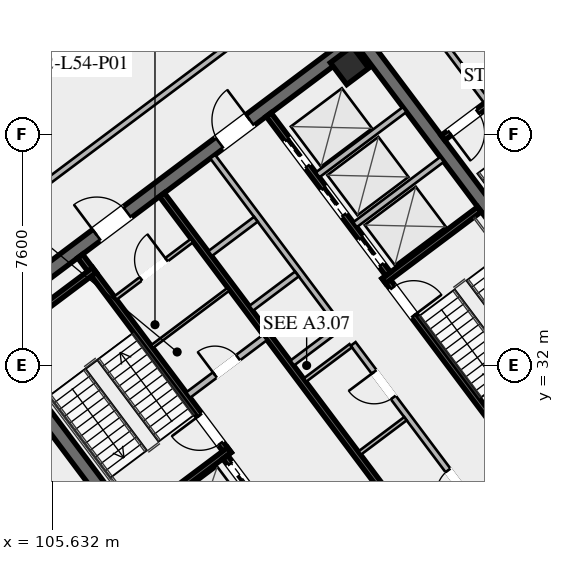
"""IFC4 building model, lengths in metres.
Left out: names, types, materials, properties, quantities, classifications, styles, units other than length and angle.
Written with IfcOpenShell. Run it as: python <this file> out.ifc"""

import sys

from ifc_helpers import new_model, si_unit, direction, frame, frame_2d, origin, origin_2d, place, context, subcontext, project, spatial, rectangle, hollow_rectangle, extrude, element, fill, save


model = new_model("IFC4")
c1 = context("Model", 3, precision=1e-05, world=origin(), true_north=direction((0.0, 1.0)))
c2 = subcontext(c1, "Body", "Model", "MODEL_VIEW")
j1 = project(units=[si_unit("LENGTHUNIT", "METRE"), si_unit("PLANEANGLEUNIT", "RADIAN")], contexts=[c1])
p1 = place(None, origin())
s1 = spatial("IfcSite", under=j1, at=p1, CompositionType="ELEMENT")
p2 = place(p1, origin())
s2 = spatial("IfcBuilding", under=s1, at=p2, CompositionType="ELEMENT")
p3 = place(p2, frame((0.0, 0.0, 199.6)))
s3 = spatial("IfcBuildingStorey", under=s2, at=p3, CompositionType="ELEMENT", Elevation=199.6)
for number, where, z_axis, x_axis in (
    (1, (112.396, 21.047, 0.0), (0.0, 0.0, 1.0), (-0.6, 0.8, 0.0)),
    (2, (115.604, 42.953, 0.0), (0.0, 0.0, 1.0), (0.6, -0.8, 0.0)),
):
    element("IfcWall", number, at=place(p3, frame(where, z_axis=z_axis, x_axis=x_axis)), inside=s3, PredefinedType="SHEAR", context=c2, shape_type="SweptSolid", body=[
        extrude(rectangle(XDim=15.6, YDim=0.45, at=frame_2d((7.8, 0.0))), origin(), (0.0, 0.0, 1.0), 4.6),
    ])
p4 = place(p3, frame((124.649, 30.518, 0.0), z_axis=(0.0, 0.0, 1.0), x_axis=(-0.8, -0.6, 0.0)))
e3 = element("IfcWall", 3, at=p4, inside=s3, PredefinedType="SHEAR", context=c2, shape_type="SweptSolid", body=[
    extrude(rectangle(XDim=15.26, YDim=0.45, at=frame_2d((7.63, 0.0))), origin(), (0.0, 0.0, 1.0), 4.6),
])
p5 = place(p4, frame((9.33, 0.0, 0.0)))
e4 = element("IfcOpeningElement", 4, at=p5, cuts=e3, PredefinedType="OPENING", context=c2, shape_type="SweptSolid", body=[
    extrude(rectangle(XDim=1.25, YDim=2.25, at=frame_2d((0.625, 1.125))), frame((0.0, 0.235, 0.0), z_axis=(0.0, -1.0, 0.0), x_axis=(1.0, 0.0, 0.0)), (0.0, 0.0, 1.0), 0.47),
])
p6 = place(p4, frame((4.28, 0.0, 0.0)))
e5 = element("IfcOpeningElement", 5, at=p6, cuts=e3, PredefinedType="OPENING", context=c2, shape_type="SweptSolid", body=[
    extrude(rectangle(XDim=1.25, YDim=2.25, at=frame_2d((0.625, 1.125))), frame((0.0, 0.235, 0.0), z_axis=(0.0, -1.0, 0.0), x_axis=(1.0, 0.0, 0.0)), (0.0, 0.0, 1.0), 0.47),
])
p7 = place(p3, frame((103.351, 33.482, 0.0), z_axis=(0.0, 0.0, 1.0), x_axis=(0.8, 0.6, 0.0)))
e6 = element("IfcWall", 6, at=p7, inside=s3, PredefinedType="SHEAR", context=c2, shape_type="SweptSolid", body=[
    extrude(rectangle(XDim=15.26, YDim=0.45, at=frame_2d((7.63, 0.0))), origin(), (0.0, 0.0, 1.0), 4.6),
])
p8 = place(p7, frame((4.68, 0.0, 0.0)))
e7 = element("IfcOpeningElement", 7, at=p8, cuts=e6, PredefinedType="OPENING", context=c2, shape_type="SweptSolid", body=[
    extrude(rectangle(XDim=1.25, YDim=2.25, at=frame_2d((0.625, 1.125))), frame((0.0, 0.235, 0.0), z_axis=(0.0, -1.0, 0.0), x_axis=(1.0, 0.0, 0.0)), (0.0, 0.0, 1.0), 0.47),
])
p9 = place(p7, frame((9.73, 0.0, 0.0)))
e8 = element("IfcOpeningElement", 8, at=p9, cuts=e6, PredefinedType="OPENING", context=c2, shape_type="SweptSolid", body=[
    extrude(rectangle(XDim=1.25, YDim=2.25, at=frame_2d((0.625, 1.125))), frame((0.0, 0.235, 0.0), z_axis=(0.0, -1.0, 0.0), x_axis=(1.0, 0.0, 0.0)), (0.0, 0.0, 1.0), 0.47),
])
p10 = place(p3, frame((115.41, 41.87, 0.0), z_axis=(0.0, 0.0, 1.0), x_axis=(0.799999996291, 0.600000004945, 0.0)))
e9 = element("IfcColumn", 9, at=p10, inside=s3, PredefinedType="COLUMN", context=c2, shape_type="SweptSolid", body=[
    extrude(hollow_rectangle(XDim=0.9, YDim=0.9, WallThickness=0.04, at=origin_2d()), origin(), (0.0, 0.0, 1.0), 4.42),
])
for number, where, z_axis, x_axis in (
    (10, (109.704, 11.928, 0.0), (0.0, 0.0, 1.0), (-0.6, 0.8, 0.0)),
    (11, (93.928, 36.296, 0.0), (0.0, 0.0, 1.0), (0.8, 0.6, 0.0)),
    (12, (118.296, 52.072, 0.0), (0.0, 0.0, 1.0), (0.6, -0.8, 0.0)),
):
    element("IfcWall", number, at=place(p3, frame(where, z_axis=z_axis, x_axis=x_axis)), inside=s3, PredefinedType="SOLIDWALL", context=c2, shape_type="SweptSolid", body=[
        extrude(rectangle(XDim=26.96, YDim=0.28, at=frame_2d((13.48, 0.0))), origin(), (0.0, 0.0, 1.0), 4.42),
    ])
p11 = place(p3, frame((111.44, 29.08, 0.0), z_axis=(0.0, 0.0, 1.0), x_axis=(-0.59999041401, 0.800007189403, 0.0)))
e13 = element("IfcWall", 13, at=p11, inside=s3, PredefinedType="SHEAR", context=c2, shape_type="SweptSolid", body=[
    extrude(rectangle(XDim=8.15, YDim=0.2, at=frame_2d((4.075, 0.0))), origin(), (0.0, 0.0, 1.0), 4.42),
])
p12 = place(p11, frame((0.45, 0.0, 0.0)))
e14 = element("IfcOpeningElement", 14, at=p12, cuts=e13, PredefinedType="OPENING", context=c2, shape_type="SweptSolid", body=[
    extrude(rectangle(XDim=1.15, YDim=2.2, at=frame_2d((0.575, 1.1))), frame((0.0, 0.11, 0.0), z_axis=(0.0, -1.0, 0.0), x_axis=(1.0, 0.0, 0.0)), (0.0, 0.0, 1.0), 0.22),
])
for number, where, z_axis, x_axis in (
    (15, (108.316, 26.862, 0.0), (0.0, 0.0, 1.0), (0.8, 0.6, 0.0)),
    (16, (103.876, 32.782, 0.0), (0.0, 0.0, 1.0), (0.8, 0.6, 0.0)),
):
    element("IfcWall", number, at=place(p3, frame(where, z_axis=z_axis, x_axis=x_axis)), inside=s3, PredefinedType="SHEAR", context=c2, shape_type="SweptSolid", body=[
        extrude(rectangle(XDim=3.93, YDim=0.2, at=frame_2d((1.965, 0.0))), origin(), (0.0, 0.0, 1.0), 4.42),
    ])
p13 = place(p3, frame((116.56, 34.92, 0.0), z_axis=(0.0, 0.0, 1.0), x_axis=(0.59999041401, -0.800007189403, 0.0)))
e17 = element("IfcWall", 17, at=p13, inside=s3, PredefinedType="SHEAR", context=c2, shape_type="SweptSolid", body=[
    extrude(rectangle(XDim=8.15, YDim=0.2, at=frame_2d((4.075, 0.0))), origin(), (0.0, 0.0, 1.0), 4.42),
])
p14 = place(p13, frame((0.45, 0.0, 0.0)))
e18 = element("IfcOpeningElement", 18, at=p14, cuts=e17, PredefinedType="OPENING", context=c2, shape_type="SweptSolid", body=[
    extrude(rectangle(XDim=1.15, YDim=2.2, at=frame_2d((0.575, 1.1))), frame((0.0, 0.11, 0.0), z_axis=(0.0, -1.0, 0.0), x_axis=(1.0, 0.0, 0.0)), (0.0, 0.0, 1.0), 0.22),
])
p15 = place(p3, frame((116.54, 34.78, 0.0), z_axis=(0.0, 0.0, 1.0), x_axis=(0.800014909178, 0.599980120581, 0.0)))
e19 = element("IfcWall", 19, at=p15, inside=s3, PredefinedType="SHEAR", context=c2, shape_type="SweptSolid", body=[
    extrude(rectangle(XDim=3.93, YDim=0.2, at=frame_2d((1.965, 0.0))), origin(), (0.0, 0.0, 1.0), 4.42),
])
p16 = place(p3, frame((118.058, 25.856, 0.0), z_axis=(0.0, 0.0, 1.0), x_axis=(-0.600002657301, 0.799998007018, 0.0)))
e20 = element("IfcWall", 20, at=p16, inside=s3, PredefinedType="SHEAR", context=c2, shape_type="SweptSolid", body=[
    extrude(rectangle(XDim=14.7, YDim=0.2, at=frame_2d((7.35, 0.0))), origin(), (0.0, 0.0, 1.0), 4.42),
])
p17 = place(p3, frame((110.104, 31.028, 0.0), z_axis=(0.0, 0.0, 1.0), x_axis=(0.800018601094, 0.59997519774, 0.0)))
e21 = element("IfcWall", 21, at=p17, inside=s3, PredefinedType="SOLIDWALL", context=c2, shape_type="SweptSolid", body=[
    extrude(rectangle(XDim=3.15, YDim=0.22, at=frame_2d((1.575, 0.0))), origin(), (0.0, 0.0, 1.0), 3.531),
])
p18 = place(p17, frame((1.1, 0.0, 0.0)))
e22 = element("IfcOpeningElement", 22, at=p18, cuts=e21, PredefinedType="OPENING", context=c2, shape_type="SweptSolid", body=[
    extrude(rectangle(XDim=0.95, YDim=2.05, at=frame_2d((0.475, 1.025))), frame((0.0, 0.12, 0.0), z_axis=(0.0, -1.0, 0.0), x_axis=(1.0, 0.0, 0.0)), (0.0, 0.0, 1.0), 0.24),
])
p19 = place(p3, frame((115.25, 23.75, 0.0), z_axis=(0.0, 0.0, 1.0), x_axis=(-0.599994036198, 0.800004472816, 0.0)))
e23 = element("IfcWall", 23, at=p19, inside=s3, PredefinedType="SHEAR", context=c2, shape_type="SweptSolid", body=[
    extrude(rectangle(XDim=6.55, YDim=0.2, at=frame_2d((3.275, 0.0))), origin(), (0.0, 0.0, 1.0), 4.42),
])
p20 = place(p19, frame((4.975, 0.0, 0.0)))
e24 = element("IfcOpeningElement", 24, at=p20, cuts=e23, PredefinedType="OPENING", context=c2, shape_type="SweptSolid", body=[
    extrude(rectangle(XDim=1.3, YDim=2.25, at=frame_2d((0.65, 1.125))), frame((0.0, 0.11, 0.0), z_axis=(0.0, -1.0, 0.0), x_axis=(1.0, 0.0, 0.0)), (0.0, 0.0, 1.0), 0.22),
])
p21 = place(p19, frame((2.975, 0.0, 0.0)))
e25 = element("IfcOpeningElement", 25, at=p21, cuts=e23, PredefinedType="OPENING", context=c2, shape_type="SweptSolid", body=[
    extrude(rectangle(XDim=1.3, YDim=2.25, at=frame_2d((0.65, 1.125))), frame((0.0, 0.11, 0.0), z_axis=(0.0, -1.0, 0.0), x_axis=(1.0, 0.0, 0.0)), (0.0, 0.0, 1.0), 0.22),
])
p22 = place(p19, frame((0.775, 0.0, 0.0)))
e26 = element("IfcOpeningElement", 26, at=p22, cuts=e23, PredefinedType="OPENING", context=c2, shape_type="SweptSolid", body=[
    extrude(rectangle(XDim=1.3, YDim=2.25, at=frame_2d((0.65, 1.125))), frame((0.0, 0.11, 0.0), z_axis=(0.0, -1.0, 0.0), x_axis=(1.0, 0.0, 0.0)), (0.0, 0.0, 1.0), 0.22),
])
p23 = place(p3, frame((112.75, 40.25, 0.0), z_axis=(0.0, 0.0, 1.0), x_axis=(0.599994036198, -0.800004472816, 0.0)))
e27 = element("IfcWall", 27, at=p23, inside=s3, PredefinedType="SHEAR", context=c2, shape_type="SweptSolid", body=[
    extrude(rectangle(XDim=6.55, YDim=0.2, at=frame_2d((3.275, 0.0))), origin(), (0.0, 0.0, 1.0), 4.42),
])
p24 = place(p23, frame((5.075, 0.0, 0.0)))
e28 = element("IfcOpeningElement", 28, at=p24, cuts=e27, PredefinedType="OPENING", context=c2, shape_type="SweptSolid", body=[
    extrude(rectangle(XDim=1.1, YDim=2.2, at=frame_2d((0.55, 1.1))), frame((0.0, 0.11, 0.0), z_axis=(0.0, -1.0, 0.0), x_axis=(1.0, 0.0, 0.0)), (0.0, 0.0, 1.0), 0.22),
])
p25 = place(p23, frame((3.025, 0.0, 0.0)))
e29 = element("IfcOpeningElement", 29, at=p25, cuts=e27, PredefinedType="OPENING", context=c2, shape_type="SweptSolid", body=[
    extrude(rectangle(XDim=1.1, YDim=2.2, at=frame_2d((0.55, 1.1))), frame((0.0, 0.11, 0.0), z_axis=(0.0, -1.0, 0.0), x_axis=(1.0, 0.0, 0.0)), (0.0, 0.0, 1.0), 0.22),
])
p26 = place(p23, frame((1.025, 0.0, 0.0)))
e30 = element("IfcOpeningElement", 30, at=p26, cuts=e27, PredefinedType="OPENING", context=c2, shape_type="SweptSolid", body=[
    extrude(rectangle(XDim=1.1, YDim=2.2, at=frame_2d((0.55, 1.1))), frame((0.0, 0.11, 0.0), z_axis=(0.0, -1.0, 0.0), x_axis=(1.0, 0.0, 0.0)), (0.0, 0.0, 1.0), 0.22),
])
for number, where, z_axis, x_axis in (
    (31, (115.59, 36.63, 0.0), (0.0, 0.0, 1.0), (0.8, 0.6, 0.0)),
    (32, (114.36, 38.27, 0.0), (0.0, 0.0, 1.0), (0.8, 0.6, 0.0)),
):
    element("IfcWall", number, at=place(p3, frame(where, z_axis=z_axis, x_axis=x_axis)), inside=s3, PredefinedType="SOLIDWALL", context=c2, shape_type="SweptSolid", body=[
        extrude(rectangle(XDim=3.58, YDim=0.2, at=frame_2d((1.79, 0.0))), origin(), (0.0, 0.0, 1.0), 4.42),
    ])
p27 = place(p3, frame((107.71, 34.22, 0.0), z_axis=(0.0, 0.0, 1.0), x_axis=(0.799981399002, 0.60002480053, 0.0)))
e33 = element("IfcWall", 33, at=p27, inside=s3, PredefinedType="PARTITIONING", context=c2, shape_type="SweptSolid", body=[
    extrude(rectangle(XDim=3.15, YDim=0.135, at=frame_2d((1.575, 0.0))), origin(), (0.0, 0.0, 1.0), 3.531),
])
p28 = place(p27, frame((1.05, 0.0, 0.0)))
e34 = element("IfcOpeningElement", 34, at=p28, cuts=e33, PredefinedType="OPENING", context=c2, shape_type="SweptSolid", body=[
    extrude(rectangle(XDim=1.05, YDim=2.2, at=frame_2d((0.525, 1.1))), frame((0.0, 0.077, 0.0), z_axis=(0.0, -1.0, 0.0), x_axis=(1.0, 0.0, 0.0)), (0.0, 0.0, 1.0), 0.155),
])
p29 = place(p3, frame((108.91, 32.62, 0.0), z_axis=(0.0, 0.0, 1.0), x_axis=(0.800018601094, 0.59997519774, 0.0)))
e35 = element("IfcWall", 35, at=p29, inside=s3, PredefinedType="PARTITIONING", context=c2, shape_type="SweptSolid", body=[
    extrude(rectangle(XDim=3.15, YDim=0.11, at=frame_2d((1.575, 0.0))), origin(), (0.0, 0.0, 1.0), 3.531),
])
p30 = place(p3, frame((119.73, 27.11, 0.0), z_axis=(0.0, 0.0, 1.0), x_axis=(-0.600005580459, 0.799995814625, 0.0)))
e36 = element("IfcWall", 36, at=p30, inside=s3, PredefinedType="SOLIDWALL", context=c2, shape_type="SweptSolid", body=[
    extrude(rectangle(XDim=7.0, YDim=0.2, at=frame_2d((3.5, 0.0))), origin(), (0.0, 0.0, 1.0), 3.531),
])
p31 = place(p30, frame((0.85, 0.0, 0.0)))
e37 = element("IfcOpeningElement", 37, at=p31, cuts=e36, PredefinedType="OPENING", context=c2, shape_type="SweptSolid", body=[
    extrude(rectangle(XDim=0.95, YDim=2.05, at=frame_2d((0.475, 1.025))), frame((0.0, 0.11, 0.0), z_axis=(0.0, -1.0, 0.0), x_axis=(1.0, 0.0, 0.0)), (0.0, 0.0, 1.0), 0.22),
])
p32 = place(p30, frame((4.8, 0.0, 0.0)))
e38 = element("IfcOpeningElement", 38, at=p32, cuts=e36, PredefinedType="OPENING", context=c2, shape_type="SweptSolid", body=[
    extrude(rectangle(XDim=1.05, YDim=2.2, at=frame_2d((0.525, 1.1))), frame((0.0, 0.11, 0.0), z_axis=(0.0, -1.0, 0.0), x_axis=(1.0, 0.0, 0.0)), (0.0, 0.0, 1.0), 0.22),
])
for number, where, z_axis, x_axis in (
    (39, (113.946, 31.522, 0.0), (0.0, 0.0, 1.0), (0.8, 0.6, 0.0)),
    (40, (115.746, 29.122, 0.0), (0.0, 0.0, 1.0), (0.8, 0.6, 0.0)),
):
    element("IfcWall", number, at=place(p3, frame(where, z_axis=z_axis, x_axis=x_axis)), inside=s3, PredefinedType="PARTITIONING", context=c2, shape_type="SweptSolid", body=[
        extrude(rectangle(XDim=1.88, YDim=0.135, at=frame_2d((0.94, 0.0))), origin(), (0.0, 0.0, 1.0), 3.531),
    ])
p33 = place(p3, frame((115.11, 33.27, 0.0), z_axis=(0.0, 0.0, 1.0), x_axis=(-0.600011160345, 0.79999162962, 0.0)))
e41 = element("IfcWall", 41, at=p33, inside=s3, PredefinedType="SOLIDWALL", context=c2, shape_type="SweptSolid", body=[
    extrude(rectangle(XDim=7.0, YDim=0.2, at=frame_2d((3.5, 0.0))), origin(), (0.0, 0.0, 1.0), 4.42),
])
p34 = place(p3, frame((113.526, 32.082, 0.0), z_axis=(0.0, 0.0, 1.0), x_axis=(0.800046745961, 0.599937666993, 0.0)))
e42 = element("IfcWall", 42, at=p34, inside=s3, PredefinedType="SOLIDWALL", context=c2, shape_type="SweptSolid", body=[
    extrude(rectangle(XDim=1.88, YDim=0.2, at=frame_2d((0.94, 0.0))), origin(), (0.0, 0.0, 1.0), 4.42),
])
p35 = place(p3, frame((112.176, 33.882, 0.0), z_axis=(0.0, 0.0, 1.0), x_axis=(0.8, 0.6, 0.0)))
e43 = element("IfcWall", 43, at=p35, inside=s3, PredefinedType="SOLIDWALL", context=c2, shape_type="SweptSolid", body=[
    extrude(rectangle(XDim=1.88, YDim=0.2, at=frame_2d((0.94, 0.0))), origin(), (0.0, 0.0, 1.0), 4.42),
])
p36 = place(p3, frame((110.826, 35.682, 0.0), z_axis=(0.0, 0.0, 1.0), x_axis=(0.799984418148, 0.600020775241, 0.0)))
e44 = element("IfcWall", 44, at=p36, inside=s3, PredefinedType="SOLIDWALL", context=c2, shape_type="SweptSolid", body=[
    extrude(rectangle(XDim=1.88, YDim=0.2, at=frame_2d((0.94, 0.0))), origin(), (0.0, 0.0, 1.0), 4.42),
])
p37 = place(p3, frame((121.204, 41.528, 0.0), z_axis=(0.0, 0.0, 1.0), x_axis=(-0.800017232136, -0.599977023131, 0.0)))
e45 = element("IfcWall", 45, at=p37, inside=s3, PredefinedType="SHEAR", context=c2, shape_type="SweptSolid", body=[
    extrude(rectangle(XDim=3.4, YDim=0.2, at=frame_2d((1.7, 0.0))), origin(), (0.0, 0.0, 1.0), 4.42),
])
p38 = place(p37, frame((1.975, 0.0, 0.0)))
e46 = element("IfcOpeningElement", 46, at=p38, cuts=e45, PredefinedType="OPENING", context=c2, shape_type="SweptSolid", body=[
    extrude(rectangle(XDim=1.15, YDim=2.2, at=frame_2d((0.575, 1.1))), frame((0.0, 0.11, 0.0), z_axis=(0.0, -1.0, 0.0), x_axis=(1.0, 0.0, 0.0)), (0.0, 0.0, 1.0), 0.22),
])
p39 = place(p3, frame((100.07, 33.99, 0.0), z_axis=(0.0, 0.0, 1.0), x_axis=(0.8, 0.6, 0.0)))
e47 = element("IfcWall", 47, at=p39, inside=s3, PredefinedType="SOLIDWALL", context=c2, shape_type="SweptSolid", body=[
    extrude(rectangle(XDim=19.9, YDim=0.2, at=frame_2d((9.95, 0.0))), origin(), (0.0, 0.0, 1.0), 3.531),
])
p40 = place(p39, frame((2.2, 0.0, 0.0)))
e48 = element("IfcOpeningElement", 48, at=p40, cuts=e47, PredefinedType="OPENING", context=c2, shape_type="SweptSolid", body=[
    extrude(rectangle(XDim=1.15, YDim=2.2, at=frame_2d((0.575, 1.1))), frame((0.0, 0.11, 0.0), z_axis=(0.0, -1.0, 0.0), x_axis=(1.0, 0.0, 0.0)), (0.0, 0.0, 1.0), 0.22),
])
p41 = place(p3, frame((127.93, 30.01, 0.0), z_axis=(0.0, 0.0, 1.0), x_axis=(-0.8, -0.6, 0.0)))
e49 = element("IfcWall", 49, at=p41, inside=s3, PredefinedType="SOLIDWALL", context=c2, shape_type="SweptSolid", body=[
    extrude(rectangle(XDim=19.9, YDim=0.2, at=frame_2d((9.95, 0.0))), origin(), (0.0, 0.0, 1.0), 3.531),
])
p42 = place(p41, frame((2.2, 0.0, 0.0)))
e50 = element("IfcOpeningElement", 50, at=p42, cuts=e49, PredefinedType="OPENING", context=c2, shape_type="SweptSolid", body=[
    extrude(rectangle(XDim=1.15, YDim=2.2, at=frame_2d((0.575, 1.1))), frame((0.0, 0.11, 0.0), z_axis=(0.0, -1.0, 0.0), x_axis=(1.0, 0.0, 0.0)), (0.0, 0.0, 1.0), 0.22),
])
p43 = place(p3, frame((116.062, 45.834, 0.0), z_axis=(0.0, 0.0, 1.0), x_axis=(0.599987849816, -0.800009112494, 0.0)))
e51 = element("IfcWall", 51, at=p43, inside=s3, PredefinedType="SOLIDWALL", context=c2, shape_type="SweptSolid", body=[
    extrude(rectangle(XDim=6.43, YDim=0.2, at=frame_2d((3.215, 0.0))), origin(), (0.0, 0.0, 1.0), 3.531),
])
p44 = place(p43, frame((3.0, 0.0, 0.0)))
e52 = element("IfcOpeningElement", 52, at=p44, cuts=e51, PredefinedType="OPENING", context=c2, shape_type="SweptSolid", body=[
    extrude(rectangle(XDim=1.25, YDim=2.25, at=frame_2d((0.625, 1.125))), frame((0.0, 0.11, 0.0), z_axis=(0.0, -1.0, 0.0), x_axis=(1.0, 0.0, 0.0)), (0.0, 0.0, 1.0), 0.22),
])
p45 = place(p3, frame((111.938, 18.166, 0.0), z_axis=(0.0, 0.0, 1.0), x_axis=(-0.59999602618, 0.80000298035, 0.0)))
e53 = element("IfcWall", 53, at=p45, inside=s3, PredefinedType="SOLIDWALL", context=c2, shape_type="SweptSolid", body=[
    extrude(rectangle(XDim=19.66, YDim=0.2, at=frame_2d((9.83, 0.0))), origin(), (0.0, 0.0, 1.0), 3.531),
])
p46 = place(p45, frame((3.0, 0.0, 0.0)))
e54 = element("IfcOpeningElement", 54, at=p46, cuts=e53, PredefinedType="OPENING", context=c2, shape_type="SweptSolid", body=[
    extrude(rectangle(XDim=1.25, YDim=2.25, at=frame_2d((0.625, 1.125))), frame((0.0, 0.11, 0.0), z_axis=(0.0, -1.0, 0.0), x_axis=(1.0, 0.0, 0.0)), (0.0, 0.0, 1.0), 0.22),
])
p47 = place(p45, frame((13.2, 0.0, 0.0)))
e55 = element("IfcOpeningElement", 55, at=p47, cuts=e53, PredefinedType="OPENING", context=c2, shape_type="SweptSolid", body=[
    extrude(rectangle(XDim=1.15, YDim=2.2, at=frame_2d((0.575, 1.1))), frame((0.0, 0.11, 0.0), z_axis=(0.0, -1.0, 0.0), x_axis=(1.0, 0.0, 0.0)), (0.0, 0.0, 1.0), 0.22),
])
p48 = place(p8, origin())
e56 = element("IfcDoor", 56, at=p48, inside=s3, OperationType="SINGLE_SWING_LEFT", PredefinedType="DOOR", context=c2, shape_type="SweptSolid", body=[
    extrude(rectangle(XDim=1.25, YDim=2.25, at=frame_2d((0.625, 1.125))), frame((0.0, 0.025, 0.0), z_axis=(0.0, -1.0, 0.0), x_axis=(1.0, 0.0, 0.0)), (0.0, 0.0, 1.0), 0.05),
])
fill(e7, e56)
p49 = place(p9, origin())
e57 = element("IfcDoor", 57, at=p49, inside=s3, OperationType="SINGLE_SWING_RIGHT", PredefinedType="DOOR", context=c2, shape_type="SweptSolid", body=[
    extrude(rectangle(XDim=1.25, YDim=2.25, at=frame_2d((0.625, 1.125))), frame((0.0, 0.025, 0.0), z_axis=(0.0, -1.0, 0.0), x_axis=(1.0, 0.0, 0.0)), (0.0, 0.0, 1.0), 0.05),
])
fill(e8, e57)
p50 = place(p12, origin())
e58 = element("IfcDoor", 58, at=p50, inside=s3, OperationType="SINGLE_SWING_RIGHT", PredefinedType="DOOR", context=c2, shape_type="SweptSolid", body=[
    extrude(rectangle(XDim=1.15, YDim=2.2, at=frame_2d((0.575, 1.1))), frame((0.0, 0.025, 0.0), z_axis=(0.0, -1.0, 0.0), x_axis=(1.0, 0.0, 0.0)), (0.0, 0.0, 1.0), 0.05),
])
fill(e14, e58)
p51 = place(p14, origin())
e59 = element("IfcDoor", 59, at=p51, inside=s3, OperationType="SINGLE_SWING_RIGHT", PredefinedType="DOOR", context=c2, shape_type="SweptSolid", body=[
    extrude(rectangle(XDim=1.15, YDim=2.2, at=frame_2d((0.575, 1.1))), frame((0.0, 0.025, 0.0), z_axis=(0.0, -1.0, 0.0), x_axis=(1.0, 0.0, 0.0)), (0.0, 0.0, 1.0), 0.05),
])
fill(e18, e59)
p52 = place(p28, origin())
e60 = element("IfcDoor", 60, at=p52, inside=s3, OperationType="SINGLE_SWING_RIGHT", PredefinedType="DOOR", context=c2, shape_type="SweptSolid", body=[
    extrude(rectangle(XDim=1.05, YDim=2.2, at=frame_2d((0.525, 1.1))), frame((0.0, 0.025, 0.0), z_axis=(0.0, -1.0, 0.0), x_axis=(1.0, 0.0, 0.0)), (0.0, 0.0, 1.0), 0.05),
])
fill(e34, e60)
p53 = place(p18, origin())
e61 = element("IfcDoor", 61, at=p53, inside=s3, OperationType="SINGLE_SWING_LEFT", PredefinedType="DOOR", context=c2, shape_type="SweptSolid", body=[
    extrude(rectangle(XDim=0.95, YDim=2.05, at=frame_2d((0.475, 1.025))), frame((0.0, 0.025, 0.0), z_axis=(0.0, -1.0, 0.0), x_axis=(1.0, 0.0, 0.0)), (0.0, 0.0, 1.0), 0.05),
])
fill(e22, e61)
p54 = place(p31, origin())
e62 = element("IfcDoor", 62, at=p54, inside=s3, OperationType="SINGLE_SWING_LEFT", PredefinedType="DOOR", context=c2, shape_type="SweptSolid", body=[
    extrude(rectangle(XDim=0.95, YDim=2.05, at=frame_2d((0.475, 1.025))), frame((0.0, 0.025, 0.0), z_axis=(0.0, -1.0, 0.0), x_axis=(1.0, 0.0, 0.0)), (0.0, 0.0, 1.0), 0.05),
])
fill(e37, e62)
p55 = place(p32, origin())
e63 = element("IfcDoor", 63, at=p55, inside=s3, OperationType="SINGLE_SWING_RIGHT", PredefinedType="DOOR", context=c2, shape_type="SweptSolid", body=[
    extrude(rectangle(XDim=1.05, YDim=2.2, at=frame_2d((0.525, 1.1))), frame((0.0, 0.025, 0.0), z_axis=(0.0, -1.0, 0.0), x_axis=(1.0, 0.0, 0.0)), (0.0, 0.0, 1.0), 0.05),
])
fill(e38, e63)
p56 = place(p38, origin())
e64 = element("IfcDoor", 64, at=p56, inside=s3, OperationType="SINGLE_SWING_RIGHT", PredefinedType="DOOR", context=c2, shape_type="SweptSolid", body=[
    extrude(rectangle(XDim=1.15, YDim=2.2, at=frame_2d((0.575, 1.1))), frame((0.0, 0.025, 0.0), z_axis=(0.0, -1.0, 0.0), x_axis=(1.0, 0.0, 0.0)), (0.0, 0.0, 1.0), 0.05),
])
fill(e46, e64)
p57 = place(p20, origin())
e65 = element("IfcDoor", 65, at=p57, inside=s3, OperationType="SLIDING_TO_LEFT", PredefinedType="DOOR", context=c2, shape_type="SweptSolid", body=[
    extrude(rectangle(XDim=1.3, YDim=2.25, at=frame_2d((0.65, 1.125))), frame((0.0, 0.025, 0.0), z_axis=(0.0, -1.0, 0.0), x_axis=(1.0, 0.0, 0.0)), (0.0, 0.0, 1.0), 0.05),
])
fill(e24, e65)
p58 = place(p24, origin())
e66 = element("IfcDoor", 66, at=p58, inside=s3, OperationType="SLIDING_TO_LEFT", PredefinedType="DOOR", context=c2, shape_type="SweptSolid", body=[
    extrude(rectangle(XDim=1.1, YDim=2.2, at=frame_2d((0.55, 1.1))), frame((0.0, 0.025, 0.0), z_axis=(0.0, -1.0, 0.0), x_axis=(1.0, 0.0, 0.0)), (0.0, 0.0, 1.0), 0.05),
])
fill(e28, e66)
p59 = place(p25, origin())
e67 = element("IfcDoor", 67, at=p59, inside=s3, OperationType="SLIDING_TO_LEFT", PredefinedType="DOOR", context=c2, shape_type="SweptSolid", body=[
    extrude(rectangle(XDim=1.1, YDim=2.2, at=frame_2d((0.55, 1.1))), frame((0.0, 0.025, 0.0), z_axis=(0.0, -1.0, 0.0), x_axis=(1.0, 0.0, 0.0)), (0.0, 0.0, 1.0), 0.05),
])
fill(e29, e67)
p60 = place(p26, origin())
e68 = element("IfcDoor", 68, at=p60, inside=s3, OperationType="SLIDING_TO_LEFT", PredefinedType="DOOR", context=c2, shape_type="SweptSolid", body=[
    extrude(rectangle(XDim=1.1, YDim=2.2, at=frame_2d((0.55, 1.1))), frame((0.0, 0.025, 0.0), z_axis=(0.0, -1.0, 0.0), x_axis=(1.0, 0.0, 0.0)), (0.0, 0.0, 1.0), 0.05),
])
fill(e30, e68)
save(model, sys.argv[1])
